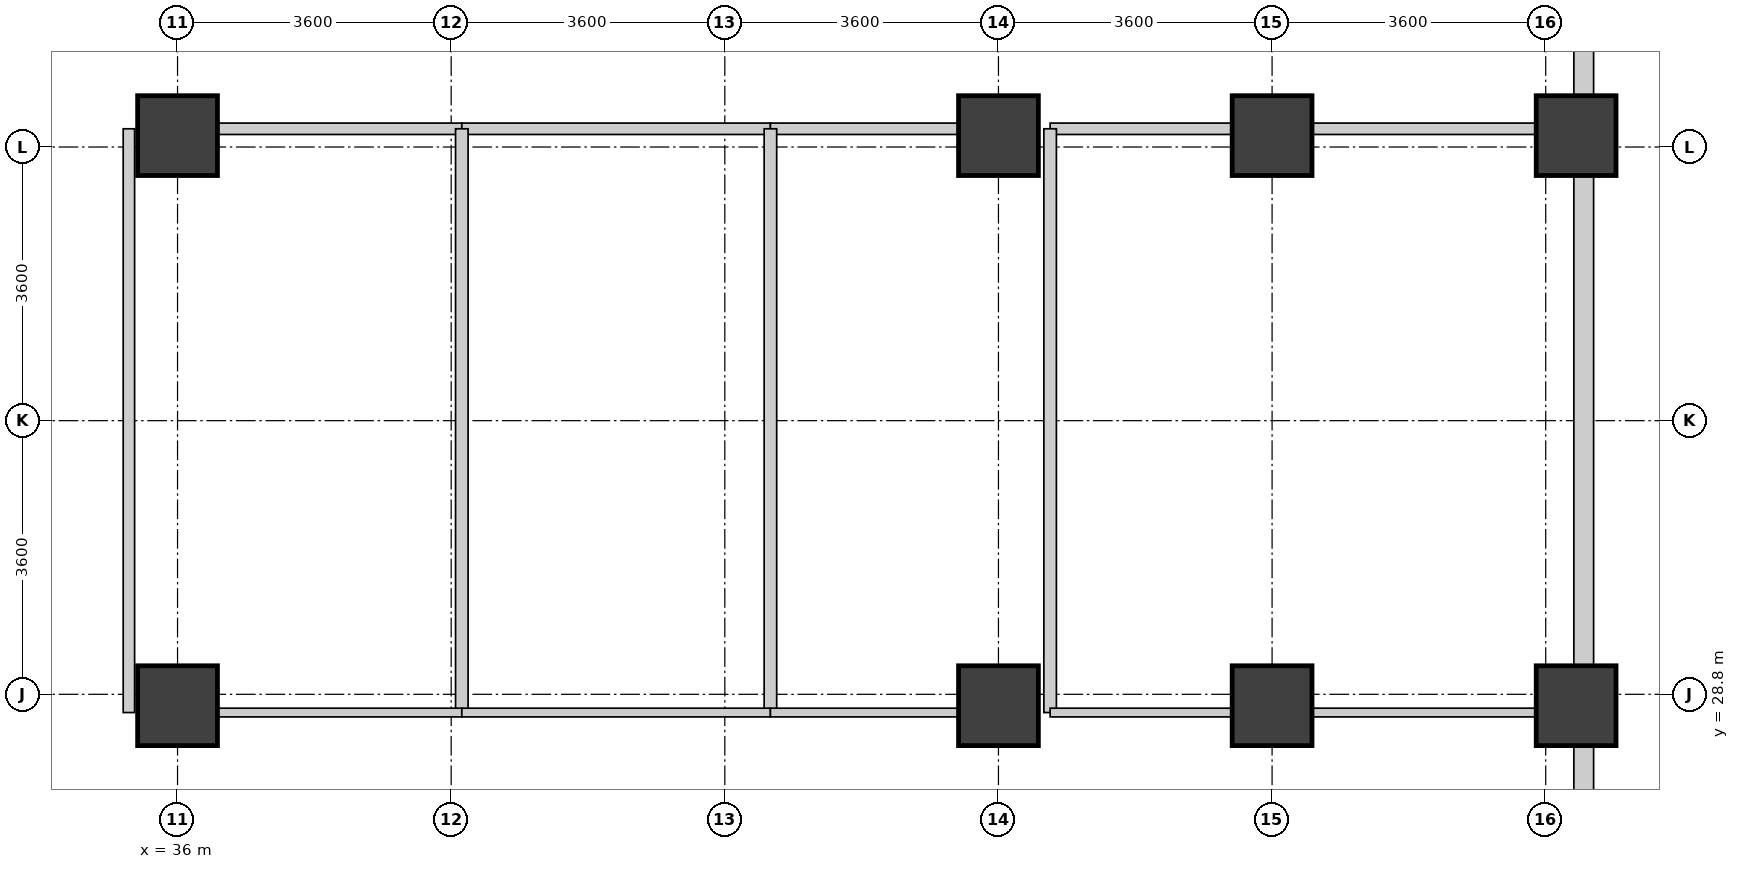
"""IFC4 building model, lengths in metres.
Left out: names, types, materials, properties, quantities, classifications, styles, units other than length and angle.
Written with IfcOpenShell. Run it as: python <this file> out.ifc"""

import sys

from ifc_helpers import new_model, si_unit, direction, frame, frame_2d, origin, origin_2d, place, context, subcontext, project, spatial, rectangle, extrude, source, transform, mapped, element, fill, save


model = new_model("IFC4")
c1 = context("Model", 3, precision=1e-05, world=origin(), true_north=direction((0.0, 1.0)))
c2 = subcontext(c1, "Body", "Model", "MODEL_VIEW")
j1 = project(units=[si_unit("LENGTHUNIT", "METRE"), si_unit("PLANEANGLEUNIT", "RADIAN")], contexts=[c1])
p1 = place(None, origin())
s1 = spatial("IfcSite", under=j1, at=p1, CompositionType="ELEMENT")
p2 = place(p1, origin())
s2 = spatial("IfcBuilding", under=s1, at=p2, CompositionType="ELEMENT")
p3 = place(p2, frame((0.0, 0.0, 135.6)))
s3 = spatial("IfcBuildingStorey", under=s2, at=p3, CompositionType="ELEMENT", Elevation=135.6)
m1 = source(origin(), c2, "Body", "SweptSolid", [
    extrude(rectangle(XDim=1.05, YDim=1.05, at=origin_2d()), origin(), (0.0, 0.0, 1.0), 4.6),
])
for number, where, z_axis, x_axis in (
    (1, (36.0, 28.65, 0.0), (0.0, 0.0, 1.0), (1.0, 0.0, 0.0)),
    (2, (36.0, 36.15, 0.0), (0.0, 0.0, 1.0), (1.0, 0.0, 0.0)),
    (3, (46.8, 28.65, 0.0), (0.0, 0.0, 1.0), (1.0, 0.0, 0.0)),
    (4, (46.8, 36.15, 0.0), (0.0, 0.0, 1.0), (1.0, 0.0, 0.0)),
    (5, (50.4, 28.65, 0.0), (0.0, 0.0, 1.0), (1.0, 0.0, 0.0)),
    (6, (50.4, 36.15, 0.0), (0.0, 0.0, 1.0), (1.0, 0.0, 0.0)),
    (7, (54.4, 28.65, 0.0), (0.0, 0.0, 1.0), (1.0, 0.0, 0.0)),
    (8, (54.4, 36.15, 0.0), (0.0, 0.0, 1.0), (1.0, 0.0, 0.0)),
):
    element("IfcColumn", number, at=place(p3, frame(where, z_axis=z_axis, x_axis=x_axis)), inside=s3, PredefinedType="COLUMN", context=c2, shape_type="MappedRepresentation", body=[
        mapped(m1, transform((0.0, 0.0, 0.0), x_axis=(1.0, 0.0, 0.0), y_axis=(0.0, 1.0, 0.0), z_axis=(0.0, 0.0, 1.0), scale=1.0)),
    ])
p4 = place(p3, frame((54.5, 28.124, 0.0), z_axis=(0.0, 0.0, 1.0), x_axis=(0.0, -1.0, 0.0)))
e9 = element("IfcWall", 9, at=p4, inside=s3, PredefinedType="STANDARD", context=c2, shape_type="SweptSolid", body=[
    extrude(rectangle(XDim=5.998, YDim=0.26, at=frame_2d((2.999, 0.0))), origin(), (0.0, 0.0, 1.0), 3.89),
])
p5 = place(p4, frame((2.099, 0.0, 0.0)))
e10 = element("IfcOpeningElement", 10, at=p5, cuts=e9, PredefinedType="OPENING", context=c2, shape_type="SweptSolid", body=[
    extrude(rectangle(XDim=1.8, YDim=2.2, at=frame_2d((0.9, 1.1))), frame((0.0, 0.14, 0.0), z_axis=(0.0, -1.0, 0.0), x_axis=(1.0, 0.0, 0.0)), (0.0, 0.0, 1.0), 0.28),
])
p6 = place(p3, frame((54.5, 35.624, 0.0), z_axis=(0.0, 0.0, 1.0), x_axis=(0.0, -1.0, 0.0)))
e11 = element("IfcWall", 11, at=p6, inside=s3, PredefinedType="STANDARD", context=c2, shape_type="SweptSolid", body=[
    extrude(rectangle(XDim=6.448, YDim=0.26, at=frame_2d((3.224, 0.0))), origin(), (0.0, 0.0, 1.0), 3.89),
])
p7 = place(p6, frame((2.749, 0.0, 0.85)))
e12 = element("IfcOpeningElement", 12, at=p7, cuts=e11, PredefinedType="OPENING", context=c2, shape_type="SweptSolid", body=[
    extrude(rectangle(XDim=0.95, YDim=1.75, at=frame_2d((0.475, 0.875))), frame((0.0, 0.14, 0.0), z_axis=(0.0, -1.0, 0.0), x_axis=(1.0, 0.0, 0.0)), (0.0, 0.0, 1.0), 0.28),
])
p8 = place(p6, frame((1.15, 0.0, 0.85)))
e13 = element("IfcOpeningElement", 13, at=p8, cuts=e11, PredefinedType="OPENING", context=c2, shape_type="SweptSolid", body=[
    extrude(rectangle(XDim=0.95, YDim=1.75, at=frame_2d((0.475, 0.875))), frame((0.0, 0.14, 0.0), z_axis=(0.0, -1.0, 0.0), x_axis=(1.0, 0.0, 0.0)), (0.0, 0.0, 1.0), 0.28),
])
p9 = place(p3, frame((54.5, 43.33, 0.0), z_axis=(0.0, 0.0, 1.0), x_axis=(0.0, -1.0, 0.0)))
e14 = element("IfcWall", 14, at=p9, inside=s3, PredefinedType="STANDARD", context=c2, shape_type="SweptSolid", body=[
    extrude(rectangle(XDim=6.654, YDim=0.26, at=frame_2d((3.327, 0.0))), origin(), (0.0, 0.0, 1.0), 4.34),
])
p10 = place(p9, frame((2.852, 0.0, 0.85)))
e15 = element("IfcOpeningElement", 15, at=p10, cuts=e14, PredefinedType="OPENING", context=c2, shape_type="SweptSolid", body=[
    extrude(rectangle(XDim=0.95, YDim=1.75, at=frame_2d((0.475, 0.875))), frame((0.0, 0.14, 0.0), z_axis=(0.0, -1.0, 0.0), x_axis=(1.0, 0.0, 0.0)), (0.0, 0.0, 1.0), 0.28),
])
p11 = place(p9, frame((1.202, 0.0, 0.85)))
e16 = element("IfcOpeningElement", 16, at=p11, cuts=e14, PredefinedType="OPENING", context=c2, shape_type="SweptSolid", body=[
    extrude(rectangle(XDim=0.95, YDim=1.75, at=frame_2d((0.475, 0.875))), frame((0.0, 0.14, 0.0), z_axis=(0.0, -1.0, 0.0), x_axis=(1.0, 0.0, 0.0)), (0.0, 0.0, 1.0), 0.28),
])
p12 = place(p3, frame((35.36, 28.56, 0.0), z_axis=(0.0, 0.0, 1.0), x_axis=(0.0, 1.0, 0.0)))
e17 = element("IfcWall", 17, at=p12, inside=s3, PredefinedType="PARTITIONING", context=c2, shape_type="SweptSolid", body=[
    extrude(rectangle(XDim=7.68, YDim=0.15, at=frame_2d((3.84, 0.0))), origin(), (0.0, 0.0, 1.0), 4.34),
])
p13 = place(p12, frame((3.19, 0.0, 0.0)))
e18 = element("IfcOpeningElement", 18, at=p13, cuts=e17, PredefinedType="OPENING", context=c2, shape_type="SweptSolid", body=[
    extrude(rectangle(XDim=1.3, YDim=2.12, at=frame_2d((0.65, 1.06))), frame((0.0, 0.085, 0.0), z_axis=(0.0, -1.0, 0.0), x_axis=(1.0, 0.0, 0.0)), (0.0, 0.0, 1.0), 0.17),
])
p14 = place(p3, frame((47.48, 36.24, 0.0), z_axis=(0.0, 0.0, 1.0), x_axis=(1.0, 0.0, 0.0)))
e19 = element("IfcWall", 19, at=p14, inside=s3, PredefinedType="PARTITIONING", context=c2, shape_type="SweptSolid", body=[
    extrude(rectangle(XDim=2.395, YDim=0.15, at=frame_2d((1.198, 0.0))), origin(), (0.0, 0.0, 1.0), 3.74),
])
p15 = place(p14, frame((0.548, 0.0, 0.0)))
e20 = element("IfcOpeningElement", 20, at=p15, cuts=e19, PredefinedType="OPENING", context=c2, shape_type="SweptSolid", body=[
    extrude(rectangle(XDim=1.3, YDim=2.12, at=frame_2d((0.65, 1.06))), frame((0.0, 0.085, 0.0), z_axis=(0.0, -1.0, 0.0), x_axis=(1.0, 0.0, 0.0)), (0.0, 0.0, 1.0), 0.17),
])
p16 = place(p3, frame((50.925, 36.24, 0.0), z_axis=(0.0, 0.0, 1.0), x_axis=(1.0, 0.0, 0.0)))
e21 = element("IfcWall", 21, at=p16, inside=s3, PredefinedType="PARTITIONING", context=c2, shape_type="SweptSolid", body=[
    extrude(rectangle(XDim=2.95, YDim=0.15, at=frame_2d((1.475, 0.0))), origin(), (0.0, 0.0, 1.0), 3.74),
])
p17 = place(p3, frame((36.525, 36.24, 0.0), z_axis=(0.0, 0.0, 1.0), x_axis=(1.0, 0.0, 0.0)))
e22 = element("IfcWall", 22, at=p17, inside=s3, PredefinedType="PARTITIONING", context=c2, shape_type="SweptSolid", body=[
    extrude(rectangle(XDim=3.215, YDim=0.15, at=frame_2d((1.607, 0.0))), origin(), (0.0, 0.0, 1.0), 3.74),
])
p18 = place(p3, frame((39.74, 36.24, 0.0), z_axis=(0.0, 0.0, 1.0), x_axis=(1.0, 0.0, 0.0)))
e23 = element("IfcWall", 23, at=p18, inside=s3, PredefinedType="PARTITIONING", context=c2, shape_type="SweptSolid", body=[
    extrude(rectangle(XDim=4.06, YDim=0.15, at=frame_2d((2.03, 0.0))), origin(), (0.0, 0.0, 1.0), 3.74),
])
p19 = place(p18, frame((1.38, 0.0, 0.0)))
e24 = element("IfcOpeningElement", 24, at=p19, cuts=e23, PredefinedType="OPENING", context=c2, shape_type="SweptSolid", body=[
    extrude(rectangle(XDim=1.3, YDim=2.12, at=frame_2d((0.65, 1.06))), frame((0.0, 0.085, 0.0), z_axis=(0.0, -1.0, 0.0), x_axis=(1.0, 0.0, 0.0)), (0.0, 0.0, 1.0), 0.17),
])
p20 = place(p3, frame((43.8, 36.24, 0.0), z_axis=(0.0, 0.0, 1.0), x_axis=(1.0, 0.0, 0.0)))
e25 = element("IfcWall", 25, at=p20, inside=s3, PredefinedType="PARTITIONING", context=c2, shape_type="SweptSolid", body=[
    extrude(rectangle(XDim=2.475, YDim=0.15, at=frame_2d((1.237, 0.0))), origin(), (0.0, 0.0, 1.0), 3.74),
])
p21 = place(p20, frame((0.587, 0.0, 0.0)))
e26 = element("IfcOpeningElement", 26, at=p21, cuts=e25, PredefinedType="OPENING", context=c2, shape_type="SweptSolid", body=[
    extrude(rectangle(XDim=1.3, YDim=2.12, at=frame_2d((0.65, 1.06))), frame((0.0, 0.085, 0.0), z_axis=(0.0, -1.0, 0.0), x_axis=(1.0, 0.0, 0.0)), (0.0, 0.0, 1.0), 0.17),
])
for number, where, z_axis, x_axis in (
    (27, (39.74, 28.56, 0.0), (0.0, 0.0, 1.0), (0.0, 1.0, 0.0)),
    (28, (43.8, 28.56, 0.0), (0.0, 0.0, 1.0), (0.0, 1.0, 0.0)),
    (29, (47.48, 28.56, 0.0), (0.0, 0.0, 1.0), (0.0, 1.0, 0.0)),
):
    element("IfcWall", number, at=place(p3, frame(where, z_axis=z_axis, x_axis=x_axis)), inside=s3, PredefinedType="PARTITIONING", context=c2, shape_type="SweptSolid", body=[
        extrude(rectangle(XDim=7.68, YDim=0.165, at=frame_2d((3.84, 0.0))), origin(), (0.0, 0.0, 1.0), 4.34),
    ])
p22 = place(p3, frame((47.48, 28.56, 0.0), z_axis=(0.0, 0.0, 1.0), x_axis=(1.0, 0.0, 0.0)))
e30 = element("IfcWall", 30, at=p22, inside=s3, PredefinedType="PARTITIONING", context=c2, shape_type="SweptSolid", body=[
    extrude(rectangle(XDim=2.395, YDim=0.115, at=frame_2d((1.198, 0.0))), origin(), (0.0, 0.0, 1.0), 3.74),
])
p23 = place(p3, frame((50.925, 28.56, 0.0), z_axis=(0.0, 0.0, 1.0), x_axis=(1.0, 0.0, 0.0)))
e31 = element("IfcWall", 31, at=p23, inside=s3, PredefinedType="PARTITIONING", context=c2, shape_type="SweptSolid", body=[
    extrude(rectangle(XDim=2.95, YDim=0.115, at=frame_2d((1.475, 0.0))), origin(), (0.0, 0.0, 1.0), 3.74),
])
p24 = place(p3, frame((36.525, 28.56, 0.0), z_axis=(0.0, 0.0, 1.0), x_axis=(1.0, 0.0, 0.0)))
e32 = element("IfcWall", 32, at=p24, inside=s3, PredefinedType="PARTITIONING", context=c2, shape_type="SweptSolid", body=[
    extrude(rectangle(XDim=3.215, YDim=0.115, at=frame_2d((1.607, 0.0))), origin(), (0.0, 0.0, 1.0), 3.74),
])
p25 = place(p3, frame((39.74, 28.56, 0.0), z_axis=(0.0, 0.0, 1.0), x_axis=(1.0, 0.0, 0.0)))
e33 = element("IfcWall", 33, at=p25, inside=s3, PredefinedType="PARTITIONING", context=c2, shape_type="SweptSolid", body=[
    extrude(rectangle(XDim=4.06, YDim=0.115, at=frame_2d((2.03, 0.0))), origin(), (0.0, 0.0, 1.0), 3.74),
])
p26 = place(p3, frame((43.8, 28.56, 0.0), z_axis=(0.0, 0.0, 1.0), x_axis=(1.0, 0.0, 0.0)))
e34 = element("IfcWall", 34, at=p26, inside=s3, PredefinedType="PARTITIONING", context=c2, shape_type="SweptSolid", body=[
    extrude(rectangle(XDim=2.475, YDim=0.115, at=frame_2d((1.237, 0.0))), origin(), (0.0, 0.0, 1.0), 3.74),
])
p27 = place(p7, origin())
e35 = element("IfcWindow", 35, at=p27, inside=s3, PartitioningType="SINGLE_PANEL", PredefinedType="WINDOW", context=c2, shape_type="SweptSolid", body=[
    extrude(rectangle(XDim=0.95, YDim=1.75, at=frame_2d((0.475, 0.875))), frame((0.0, 0.03, 0.0), z_axis=(0.0, -1.0, 0.0), x_axis=(1.0, 0.0, 0.0)), (0.0, 0.0, 1.0), 0.06),
])
fill(e12, e35)
p28 = place(p8, origin())
e36 = element("IfcWindow", 36, at=p28, inside=s3, PartitioningType="SINGLE_PANEL", PredefinedType="WINDOW", context=c2, shape_type="SweptSolid", body=[
    extrude(rectangle(XDim=0.95, YDim=1.75, at=frame_2d((0.475, 0.875))), frame((0.0, 0.03, 0.0), z_axis=(0.0, -1.0, 0.0), x_axis=(1.0, 0.0, 0.0)), (0.0, 0.0, 1.0), 0.06),
])
fill(e13, e36)
p29 = place(p13, origin())
e37 = element("IfcDoor", 37, at=p29, inside=s3, OperationType="DOUBLE_DOOR_SINGLE_SWING", PredefinedType="DOOR", context=c2, shape_type="SweptSolid", body=[
    extrude(rectangle(XDim=1.3, YDim=2.12, at=frame_2d((0.65, 1.06))), frame((0.0, 0.025, 0.0), z_axis=(0.0, -1.0, 0.0), x_axis=(1.0, 0.0, 0.0)), (0.0, 0.0, 1.0), 0.05),
])
fill(e18, e37)
p30 = place(p15, origin())
e38 = element("IfcDoor", 38, at=p30, inside=s3, OperationType="DOUBLE_DOOR_SINGLE_SWING", PredefinedType="DOOR", context=c2, shape_type="SweptSolid", body=[
    extrude(rectangle(XDim=1.3, YDim=2.12, at=frame_2d((0.65, 1.06))), frame((0.0, 0.025, 0.0), z_axis=(0.0, -1.0, 0.0), x_axis=(1.0, 0.0, 0.0)), (0.0, 0.0, 1.0), 0.05),
])
fill(e20, e38)
p31 = place(p19, origin())
e39 = element("IfcDoor", 39, at=p31, inside=s3, OperationType="DOUBLE_DOOR_SINGLE_SWING", PredefinedType="DOOR", context=c2, shape_type="SweptSolid", body=[
    extrude(rectangle(XDim=1.3, YDim=2.12, at=frame_2d((0.65, 1.06))), frame((0.0, 0.025, 0.0), z_axis=(0.0, -1.0, 0.0), x_axis=(1.0, 0.0, 0.0)), (0.0, 0.0, 1.0), 0.05),
])
fill(e24, e39)
p32 = place(p21, origin())
e40 = element("IfcDoor", 40, at=p32, inside=s3, OperationType="DOUBLE_DOOR_SINGLE_SWING", PredefinedType="DOOR", context=c2, shape_type="SweptSolid", body=[
    extrude(rectangle(XDim=1.3, YDim=2.12, at=frame_2d((0.65, 1.06))), frame((0.0, 0.025, 0.0), z_axis=(0.0, -1.0, 0.0), x_axis=(1.0, 0.0, 0.0)), (0.0, 0.0, 1.0), 0.05),
])
fill(e26, e40)
save(model, sys.argv[1])
